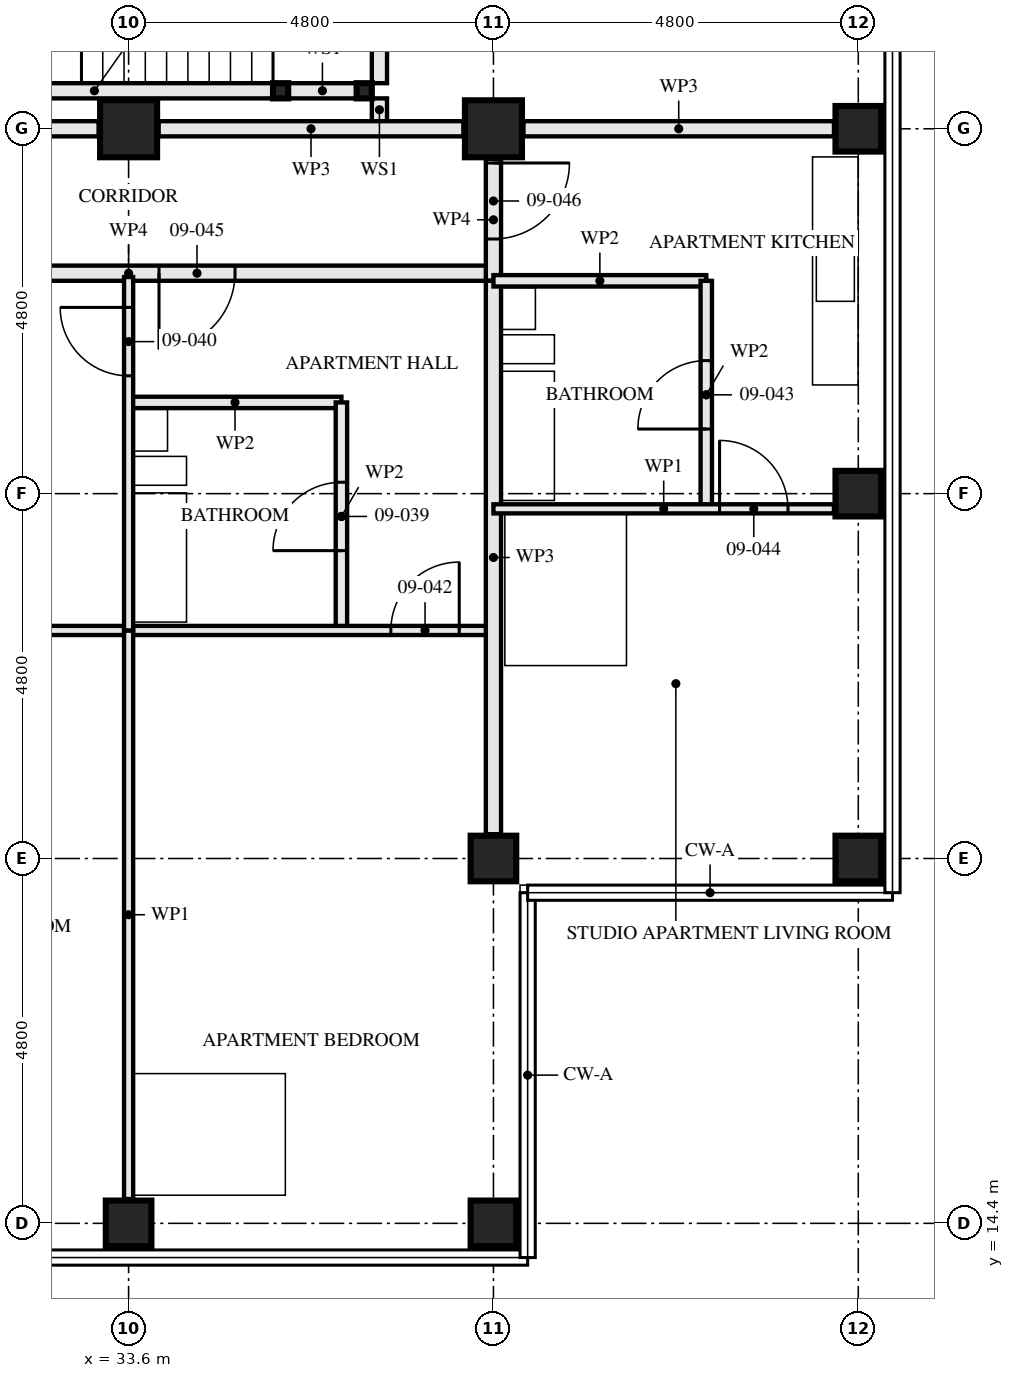
"""IFC4 building model, lengths in metres.
Left out: names, types, materials, properties, quantities, classifications, styles, units other than length and angle.
Written with IfcOpenShell. Run it as: python <this file> out.ifc"""

import sys

from ifc_helpers import new_model, si_unit, direction, frame, frame_2d, origin, origin_2d, place, context, subcontext, project, spatial, rectangle, hollow_rectangle, extrude, element, fill, save


model = new_model("IFC4")
c1 = context("Model", 3, precision=1e-05, world=origin(), true_north=direction((0.0, 1.0)))
c2 = subcontext(c1, "Body", "Model", "MODEL_VIEW")
j1 = project(units=[si_unit("LENGTHUNIT", "METRE"), si_unit("PLANEANGLEUNIT", "RADIAN")], contexts=[c1])
p1 = place(None, origin())
s1 = spatial("IfcSite", under=j1, at=p1, CompositionType="ELEMENT")
p2 = place(p1, origin())
s2 = spatial("IfcBuilding", under=s1, at=p2, CompositionType="ELEMENT")
p3 = place(p2, frame((0.0, 0.0, 37.5)))
s3 = spatial("IfcBuildingStorey", under=s2, at=p3, CompositionType="ELEMENT", Elevation=37.5)
p4 = place(p3, frame((33.6, 14.4, 0.0), z_axis=(0.0, 0.0, 1.0), x_axis=(0.0, 1.0, 0.0)))
e1 = element("IfcColumn", 1, at=p4, inside=s3, PredefinedType="COLUMN", context=c2, shape_type="SweptSolid", body=[
    extrude(hollow_rectangle(XDim=0.6, YDim=0.6, WallThickness=0.08, at=origin_2d()), origin(), (0.0, 0.0, 1.0), 3.5),
])
p5 = place(p3, frame((33.6, 28.8, 0.0), z_axis=(0.0, 0.0, 1.0), x_axis=(0.0, 1.0, 0.0)))
e2 = element("IfcColumn", 2, at=p5, inside=s3, PredefinedType="COLUMN", context=c2, shape_type="SweptSolid", body=[
    extrude(hollow_rectangle(XDim=0.75, YDim=0.75, WallThickness=0.08, at=origin_2d()), origin(), (0.0, 0.0, 1.0), 3.5),
])
for number, where, z_axis, x_axis in (
    (3, (38.4, 14.4, 0.0), (0.0, 0.0, 1.0), (0.0, 1.0, 0.0)),
    (4, (38.4, 19.2, 0.0), (0.0, 0.0, 1.0), (0.0, 1.0, 0.0)),
):
    element("IfcColumn", number, at=place(p3, frame(where, z_axis=z_axis, x_axis=x_axis)), inside=s3, PredefinedType="COLUMN", context=c2, shape_type="SweptSolid", body=[
        extrude(hollow_rectangle(XDim=0.6, YDim=0.6, WallThickness=0.08, at=origin_2d()), origin(), (0.0, 0.0, 1.0), 3.5),
    ])
p6 = place(p3, frame((38.4, 28.8, 0.0), z_axis=(0.0, 0.0, 1.0), x_axis=(0.0, 1.0, 0.0)))
e5 = element("IfcColumn", 5, at=p6, inside=s3, PredefinedType="COLUMN", context=c2, shape_type="SweptSolid", body=[
    extrude(hollow_rectangle(XDim=0.75, YDim=0.75, WallThickness=0.08, at=origin_2d()), origin(), (0.0, 0.0, 1.0), 3.5),
])
for number, where, z_axis, x_axis in (
    (6, (43.2, 19.2, 0.0), (0.0, 0.0, 1.0), (0.0, 1.0, 0.0)),
    (7, (43.2, 24.0, 0.0), (0.0, 0.0, 1.0), (1.0, 0.0, 0.0)),
    (8, (43.2, 28.8, 0.0), (0.0, 0.0, 1.0), (0.0, 1.0, 0.0)),
):
    element("IfcColumn", number, at=place(p3, frame(where, z_axis=z_axis, x_axis=x_axis)), inside=s3, PredefinedType="COLUMN", context=c2, shape_type="SweptSolid", body=[
        extrude(hollow_rectangle(XDim=0.6, YDim=0.6, WallThickness=0.08, at=origin_2d()), origin(), (0.0, 0.0, 1.0), 3.5),
    ])
for number, where, z_axis, x_axis in (
    (9, (36.7, 29.3, 0.0), (0.0, 0.0, 1.0), (1.0, 0.0, 0.0)),
    (10, (35.6, 29.3, 0.0), (0.0, 0.0, 1.0), (1.0, 0.0, 0.0)),
):
    element("IfcColumn", number, at=place(p3, frame(where, z_axis=z_axis, x_axis=x_axis)), inside=s3, PredefinedType="COLUMN", context=c2, shape_type="SweptSolid", body=[
        extrude(hollow_rectangle(XDim=0.2, YDim=0.2, WallThickness=0.008, at=origin_2d()), origin(), (0.0, 0.0, 1.0), 3.33),
    ])
p7 = place(p3, frame((36.4, 22.2, 0.0), z_axis=(0.0, 0.0, 1.0), x_axis=(0.0, 1.0, 0.0)))
e11 = element("IfcWall", 11, at=p7, inside=s3, PredefinedType="PARTITIONING", context=c2, shape_type="SweptSolid", body=[
    extrude(rectangle(XDim=3.0, YDim=0.15, at=frame_2d((1.5, 0.0))), origin(), (0.0, 0.0, 1.0), 2.55),
])
p8 = place(p7, frame((1.05, 0.0, 0.0)))
e12 = element("IfcOpeningElement", 12, at=p8, cuts=e11, PredefinedType="OPENING", context=c2, shape_type="SweptSolid", body=[
    extrude(rectangle(XDim=0.9, YDim=2.1, at=frame_2d((0.45, 1.05))), frame((0.0, 0.085, 0.0), z_axis=(0.0, -1.0, 0.0), x_axis=(1.0, 0.0, 0.0)), (0.0, 0.0, 1.0), 0.171),
])
p9 = place(p3, frame((33.6, 25.2, 0.0), z_axis=(0.0, 0.0, 1.0), x_axis=(1.0, 0.0, 0.0)))
e13 = element("IfcWall", 13, at=p9, inside=s3, PredefinedType="PARTITIONING", context=c2, shape_type="SweptSolid", body=[
    extrude(rectangle(XDim=2.8, YDim=0.15, at=frame_2d((1.4, 0.0))), origin(), (0.0, 0.0, 1.0), 3.33),
])
p10 = place(p3, frame((33.6, 22.2, 0.0), z_axis=(0.0, 0.0, 1.0), x_axis=(0.0, 1.0, 0.0)))
e14 = element("IfcWall", 14, at=p10, inside=s3, PredefinedType="PARTITIONING", context=c2, shape_type="SweptSolid", body=[
    extrude(rectangle(XDim=4.65, YDim=0.12, at=frame_2d((2.325, 0.0))), origin(), (0.0, 0.0, 1.0), 2.55),
])
p11 = place(p10, frame((3.35, 0.0, 0.0)))
e15 = element("IfcOpeningElement", 15, at=p11, cuts=e14, PredefinedType="OPENING", context=c2, shape_type="SweptSolid", body=[
    extrude(rectangle(XDim=0.9, YDim=2.1, at=frame_2d((0.45, 1.05))), frame((0.0, 0.071, 0.0), z_axis=(0.0, -1.0, 0.0), x_axis=(1.0, 0.0, 0.0)), (0.0, 0.0, 1.0), 0.141),
])
p12 = place(p3, frame((28.8, 22.2, 0.0), z_axis=(0.0, 0.0, 1.0), x_axis=(1.0, 0.0, 0.0)))
e16 = element("IfcWall", 16, at=p12, inside=s3, PredefinedType="PARTITIONING", context=c2, shape_type="SweptSolid", body=[
    extrude(rectangle(XDim=4.8, YDim=0.12, at=frame_2d((2.4, 0.0))), origin(), (0.0, 0.0, 1.0), 3.33),
])
p13 = place(p12, frame((0.45, 0.0, 0.0)))
e17 = element("IfcOpeningElement", 17, at=p13, cuts=e16, PredefinedType="OPENING", context=c2, shape_type="SweptSolid", body=[
    extrude(rectangle(XDim=0.9, YDim=2.1, at=frame_2d((0.45, 1.05))), frame((0.0, 0.071, 0.0), z_axis=(0.0, -1.0, 0.0), x_axis=(1.0, 0.0, 0.0)), (0.0, 0.0, 1.0), 0.141),
])
p14 = place(p3, frame((33.6, 22.2, 0.0), z_axis=(0.0, 0.0, 1.0), x_axis=(1.0, 0.0, 0.0)))
e18 = element("IfcWall", 18, at=p14, inside=s3, PredefinedType="PARTITIONING", context=c2, shape_type="SweptSolid", body=[
    extrude(rectangle(XDim=4.8, YDim=0.12, at=frame_2d((2.4, 0.0))), origin(), (0.0, 0.0, 1.0), 3.33),
])
p15 = place(p14, frame((3.45, 0.0, 0.0)))
e19 = element("IfcOpeningElement", 19, at=p15, cuts=e18, PredefinedType="OPENING", context=c2, shape_type="SweptSolid", body=[
    extrude(rectangle(XDim=0.9, YDim=2.1, at=frame_2d((0.45, 1.05))), frame((0.0, 0.071, 0.0), z_axis=(0.0, -1.0, 0.0), x_axis=(1.0, 0.0, 0.0)), (0.0, 0.0, 1.0), 0.141),
])
p16 = place(p3, frame((33.6, 14.72, 0.0), z_axis=(0.0, 0.0, 1.0), x_axis=(0.0, 1.0, 0.0)))
e20 = element("IfcWall", 20, at=p16, inside=s3, PredefinedType="PARTITIONING", context=c2, shape_type="SweptSolid", body=[
    extrude(rectangle(XDim=7.48, YDim=0.12, at=frame_2d((3.74, 0.0))), origin(), (0.0, 0.0, 1.0), 2.55),
])
p17 = place(p3, frame((38.4, 19.52, 0.0), z_axis=(0.0, 0.0, 1.0), x_axis=(0.0, 1.0, 0.0)))
e21 = element("IfcWall", 21, at=p17, inside=s3, PredefinedType="PARTITIONING", context=c2, shape_type="SweptSolid", body=[
    extrude(rectangle(XDim=7.28, YDim=0.2, at=frame_2d((3.64, 0.0))), origin(), (0.0, 0.0, 1.0), 2.55),
])
p18 = place(p3, frame((41.2, 23.8, 0.0), z_axis=(0.0, 0.0, 1.0), x_axis=(0.0, 1.0, 0.0)))
e22 = element("IfcWall", 22, at=p18, inside=s3, PredefinedType="PARTITIONING", context=c2, shape_type="SweptSolid", body=[
    extrude(rectangle(XDim=3.0, YDim=0.15, at=frame_2d((1.5, 0.0))), origin(), (0.0, 0.0, 1.0), 2.55),
])
p19 = place(p18, frame((1.05, 0.0, 0.0)))
e23 = element("IfcOpeningElement", 23, at=p19, cuts=e22, PredefinedType="OPENING", context=c2, shape_type="SweptSolid", body=[
    extrude(rectangle(XDim=0.9, YDim=2.1, at=frame_2d((0.45, 1.05))), frame((0.0, 0.085, 0.0), z_axis=(0.0, -1.0, 0.0), x_axis=(1.0, 0.0, 0.0)), (0.0, 0.0, 1.0), 0.171),
])
p20 = place(p3, frame((38.4, 26.8, 0.0), z_axis=(0.0, 0.0, 1.0), x_axis=(1.0, 0.0, 0.0)))
e24 = element("IfcWall", 24, at=p20, inside=s3, PredefinedType="PARTITIONING", context=c2, shape_type="SweptSolid", body=[
    extrude(rectangle(XDim=2.8, YDim=0.15, at=frame_2d((1.4, 0.0))), origin(), (0.0, 0.0, 1.0), 3.33),
])
p21 = place(p3, frame((38.4, 23.8, 0.0), z_axis=(0.0, 0.0, 1.0), x_axis=(1.0, 0.0, 0.0)))
e25 = element("IfcWall", 25, at=p21, inside=s3, PredefinedType="PARTITIONING", context=c2, shape_type="SweptSolid", body=[
    extrude(rectangle(XDim=4.48, YDim=0.12, at=frame_2d((2.24, 0.0))), origin(), (0.0, 0.0, 1.0), 3.33),
])
p22 = place(p21, frame((2.975, 0.0, 0.0)))
e26 = element("IfcOpeningElement", 26, at=p22, cuts=e25, PredefinedType="OPENING", context=c2, shape_type="SweptSolid", body=[
    extrude(rectangle(XDim=0.9, YDim=2.1, at=frame_2d((0.45, 1.05))), frame((0.0, 0.071, 0.0), z_axis=(0.0, -1.0, 0.0), x_axis=(1.0, 0.0, 0.0)), (0.0, 0.0, 1.0), 0.141),
])
p23 = place(p3, frame((28.8, 26.9, 0.0), z_axis=(0.0, 0.0, 1.0), x_axis=(1.0, 0.0, 0.0)))
e27 = element("IfcWall", 27, at=p23, inside=s3, PredefinedType="PARTITIONING", context=c2, shape_type="SweptSolid", body=[
    extrude(rectangle(XDim=9.6, YDim=0.2, at=frame_2d((4.8, 0.0))), origin(), (0.0, 0.0, 1.0), 3.33),
])
p24 = place(p23, frame((5.2, 0.0, 0.0)))
e28 = element("IfcOpeningElement", 28, at=p24, cuts=e27, PredefinedType="OPENING", context=c2, shape_type="SweptSolid", body=[
    extrude(rectangle(XDim=1.0, YDim=2.1, at=frame_2d((0.5, 1.05))), frame((0.0, 0.111, 0.0), z_axis=(0.0, -1.0, 0.0), x_axis=(1.0, 0.0, 0.0)), (0.0, 0.0, 1.0), 0.221),
])
p25 = place(p3, frame((38.4, 26.8, 0.0), z_axis=(0.0, 0.0, 1.0), x_axis=(0.0, 1.0, 0.0)))
e29 = element("IfcWall", 29, at=p25, inside=s3, PredefinedType="PARTITIONING", context=c2, shape_type="SweptSolid", body=[
    extrude(rectangle(XDim=1.605, YDim=0.2, at=frame_2d((0.802, 0.0))), origin(), (0.0, 0.0, 1.0), 3.33),
])
p26 = place(p25, frame((0.55, 0.0, 0.0)))
e30 = element("IfcOpeningElement", 30, at=p26, cuts=e29, PredefinedType="OPENING", context=c2, shape_type="SweptSolid", body=[
    extrude(rectangle(XDim=1.0, YDim=2.1, at=frame_2d((0.5, 1.05))), frame((0.0, 0.111, 0.0), z_axis=(0.0, -1.0, 0.0), x_axis=(1.0, 0.0, 0.0)), (0.0, 0.0, 1.0), 0.221),
])
p27 = place(p3, frame((36.6, 29.3, 0.0), z_axis=(0.0, 0.0, 1.0), x_axis=(-1.0, 0.0, 0.0)))
e31 = element("IfcWall", 31, at=p27, inside=s3, PredefinedType="SOLIDWALL", context=c2, shape_type="SweptSolid", body=[
    extrude(rectangle(XDim=0.9, YDim=0.2, at=frame_2d((0.45, 0.0))), origin(), (0.0, 0.0, 1.0), 2.99),
])
p28 = place(p3, frame((35.5, 29.3, 0.0), z_axis=(0.0, 0.0, 1.0), x_axis=(-1.0, 0.0, 0.0)))
e32 = element("IfcWall", 32, at=p28, inside=s3, PredefinedType="SOLIDWALL", context=c2, shape_type="SweptSolid", body=[
    extrude(rectangle(XDim=4.7, YDim=0.2, at=frame_2d((2.35, 0.0))), origin(), (0.0, 0.0, 1.0), 2.99),
])
p29 = place(p3, frame((36.9, 28.9, 0.0), z_axis=(0.0, 0.0, 1.0), x_axis=(0.0, 1.0, 0.0)))
e33 = element("IfcWall", 33, at=p29, inside=s3, PredefinedType="SOLIDWALL", context=c2, shape_type="SweptSolid", body=[
    extrude(rectangle(XDim=0.3, YDim=0.2, at=frame_2d((0.15, 0.0))), origin(), (0.0, 0.0, 1.0), 3.33),
])
p30 = place(p3, frame((36.9, 29.4, 0.0), z_axis=(0.0, 0.0, 1.0), x_axis=(0.0, 1.0, 0.0)))
e34 = element("IfcWall", 34, at=p30, inside=s3, PredefinedType="SOLIDWALL", context=c2, shape_type="SweptSolid", body=[
    extrude(rectangle(XDim=2.6, YDim=0.2, at=frame_2d((1.3, 0.0))), origin(), (0.0, 0.0, 1.0), 3.33),
])
p31 = place(p3, frame((42.88, 28.8, 0.0), z_axis=(0.0, 0.0, 1.0), x_axis=(-1.0, 0.0, 0.0)))
e35 = element("IfcWall", 35, at=p31, inside=s3, PredefinedType="PARTITIONING", context=c2, shape_type="SweptSolid", body=[
    extrude(rectangle(XDim=4.085, YDim=0.2, at=frame_2d((2.042, 0.0))), origin(), (0.0, 0.0, 1.0), 2.32),
])
p32 = place(p3, frame((38.005, 28.8, 0.0), z_axis=(0.0, 0.0, 1.0), x_axis=(-1.0, 0.0, 0.0)))
e36 = element("IfcWall", 36, at=p32, inside=s3, PredefinedType="PARTITIONING", context=c2, shape_type="SweptSolid", body=[
    extrude(rectangle(XDim=4.01, YDim=0.2, at=frame_2d((2.005, 0.0))), origin(), (0.0, 0.0, 1.0), 2.32),
])
p33 = place(p3, frame((33.205, 28.8, 0.0), z_axis=(0.0, 0.0, 1.0), x_axis=(-1.0, 0.0, 0.0)))
e37 = element("IfcWall", 37, at=p33, inside=s3, PredefinedType="PARTITIONING", context=c2, shape_type="SweptSolid", body=[
    extrude(rectangle(XDim=2.505, YDim=0.2, at=frame_2d((1.252, 0.0))), origin(), (0.0, 0.0, 1.0), 2.32),
])
p34 = place(p8, origin())
e38 = element("IfcDoor", 38, at=p34, inside=s3, OperationType="SINGLE_SWING_RIGHT", PredefinedType="DOOR", context=c2, shape_type="SweptSolid", body=[
    extrude(rectangle(XDim=0.9, YDim=2.1, at=frame_2d((0.45, 1.05))), frame((0.0, 0.022, 0.0), z_axis=(0.0, -1.0, 0.0), x_axis=(1.0, 0.0, 0.0)), (0.0, 0.0, 1.0), 0.044),
])
fill(e12, e38)
p35 = place(p11, origin())
e39 = element("IfcDoor", 39, at=p35, inside=s3, OperationType="SINGLE_SWING_LEFT", PredefinedType="DOOR", context=c2, shape_type="SweptSolid", body=[
    extrude(rectangle(XDim=0.9, YDim=2.1, at=frame_2d((0.45, 1.05))), frame((0.0, 0.022, 0.0), z_axis=(0.0, -1.0, 0.0), x_axis=(1.0, 0.0, 0.0)), (0.0, 0.0, 1.0), 0.044),
])
fill(e15, e39)
p36 = place(p15, origin())
e40 = element("IfcDoor", 40, at=p36, inside=s3, OperationType="SINGLE_SWING_LEFT", PredefinedType="DOOR", context=c2, shape_type="SweptSolid", body=[
    extrude(rectangle(XDim=0.9, YDim=2.1, at=frame_2d((0.45, 1.05))), frame((0.0, 0.022, 0.0), z_axis=(0.0, -1.0, 0.0), x_axis=(1.0, 0.0, 0.0)), (0.0, 0.0, 1.0), 0.044),
])
fill(e19, e40)
p37 = place(p19, origin())
e41 = element("IfcDoor", 41, at=p37, inside=s3, OperationType="SINGLE_SWING_RIGHT", PredefinedType="DOOR", context=c2, shape_type="SweptSolid", body=[
    extrude(rectangle(XDim=0.9, YDim=2.1, at=frame_2d((0.45, 1.05))), frame((0.0, 0.022, 0.0), z_axis=(0.0, -1.0, 0.0), x_axis=(1.0, 0.0, 0.0)), (0.0, 0.0, 1.0), 0.044),
])
fill(e23, e41)
p38 = place(p22, origin())
e42 = element("IfcDoor", 42, at=p38, inside=s3, OperationType="SINGLE_SWING_RIGHT", PredefinedType="DOOR", context=c2, shape_type="SweptSolid", body=[
    extrude(rectangle(XDim=0.9, YDim=2.1, at=frame_2d((0.45, 1.05))), frame((0.0, 0.022, 0.0), z_axis=(0.0, -1.0, 0.0), x_axis=(1.0, 0.0, 0.0)), (0.0, 0.0, 1.0), 0.044),
])
fill(e26, e42)
p39 = place(p24, frame((1.0, 0.0, 0.0), z_axis=(0.0, 0.0, 1.0), x_axis=(-1.0, 0.0, 0.0)))
e43 = element("IfcDoor", 43, at=p39, inside=s3, OperationType="SINGLE_SWING_LEFT", PredefinedType="DOOR", context=c2, shape_type="SweptSolid", body=[
    extrude(rectangle(XDim=1.0, YDim=2.1, at=frame_2d((0.5, 1.05))), frame((0.0, 0.027, 0.0), z_axis=(0.0, -1.0, 0.0), x_axis=(1.0, 0.0, 0.0)), (0.0, 0.0, 1.0), 0.054),
])
fill(e28, e43)
p40 = place(p26, frame((1.0, 0.0, 0.0), z_axis=(0.0, 0.0, 1.0), x_axis=(-1.0, 0.0, 0.0)))
e44 = element("IfcDoor", 44, at=p40, inside=s3, OperationType="SINGLE_SWING_RIGHT", PredefinedType="DOOR", context=c2, shape_type="SweptSolid", body=[
    extrude(rectangle(XDim=1.0, YDim=2.1, at=frame_2d((0.5, 1.05))), frame((0.0, 0.027, 0.0), z_axis=(0.0, -1.0, 0.0), x_axis=(1.0, 0.0, 0.0)), (0.0, 0.0, 1.0), 0.054),
])
fill(e30, e44)
save(model, sys.argv[1])
